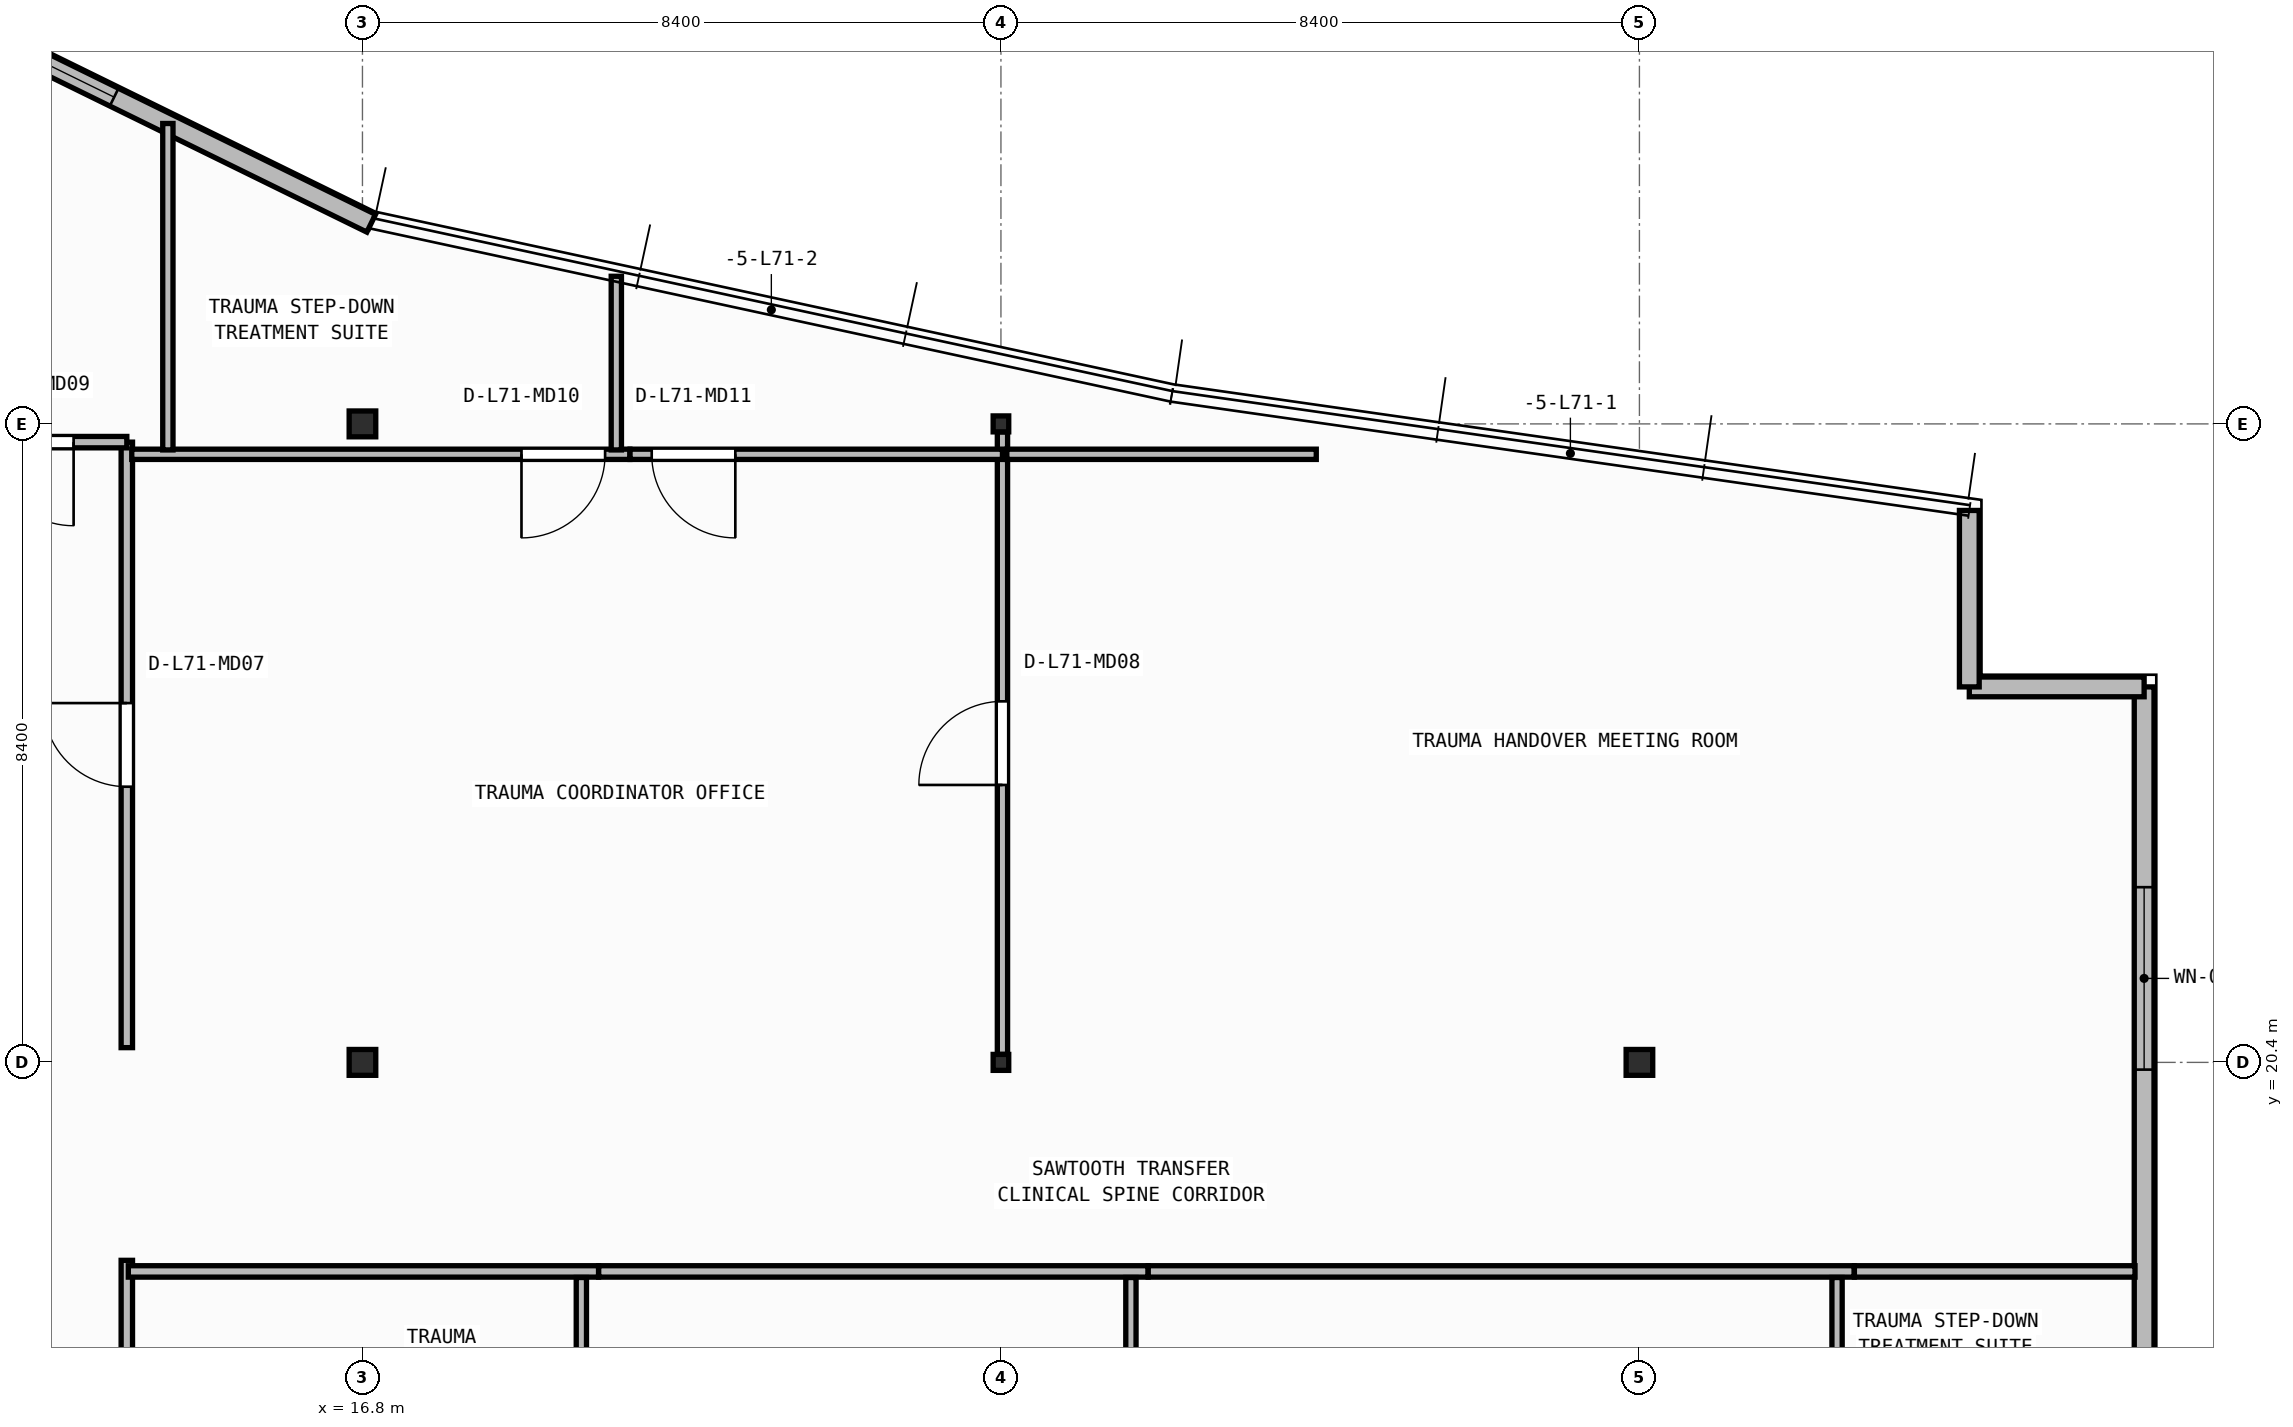
"""IFC4 building model, lengths in metres.
Left out: names, types, materials, properties, quantities, classifications, styles, units other than length and angle.
Written with IfcOpenShell. Run it as: python <this file> out.ifc"""

import sys

from ifc_helpers import new_model, si_unit, direction, frame, frame_2d, origin, origin_2d, place, context, subcontext, project, spatial, rectangle, i_section, extrude, element, fill, save


model = new_model("IFC4")
c1 = context("Model", 3, precision=1e-05, world=origin(), true_north=direction((0.0, 1.0)))
c2 = subcontext(c1, "Body", "Model", "MODEL_VIEW")
j1 = project(units=[si_unit("LENGTHUNIT", "METRE"), si_unit("PLANEANGLEUNIT", "RADIAN")], contexts=[c1])
p1 = place(None, origin())
s1 = spatial("IfcSite", under=j1, at=p1, CompositionType="ELEMENT")
p2 = place(p1, origin())
s2 = spatial("IfcBuilding", under=s1, at=p2, CompositionType="ELEMENT")
p3 = place(p2, frame((0.0, 0.0, 288.15)))
s3 = spatial("IfcBuildingStorey", under=s2, at=p3, CompositionType="ELEMENT", Elevation=288.15)
p4 = place(p3, frame((16.8, 20.4, 0.0), z_axis=(0.0, 0.0, 1.0), x_axis=(1.0, 0.0, 0.0)))
e1 = element("IfcColumn", 1, at=p4, inside=s3, PredefinedType="COLUMN", context=c2, shape_type="SweptSolid", body=[
    extrude(i_section(OverallWidth=0.35, OverallDepth=0.34, WebThickness=0.016, FlangeThickness=0.028, at=origin_2d()), origin(), (0.0, 0.0, 1.0), 3.95),
])
p5 = place(p3, frame((25.2, 20.4, 0.0), z_axis=(0.0, 0.0, 1.0), x_axis=(1.0, 0.0, 0.0)))
e2 = element("IfcColumn", 2, at=p5, inside=s3, PredefinedType="COLUMN", context=c2, shape_type="SweptSolid", body=[
    extrude(i_section(OverallWidth=0.205, OverallDepth=0.21, WebThickness=0.009, FlangeThickness=0.014, FilletRadius=0.011, at=origin_2d()), origin(), (0.0, 0.0, 1.0), 3.95),
])
for number, where, z_axis, x_axis in (
    (3, (33.6, 20.4, 0.0), (0.0, 0.0, 1.0), (1.0, 0.0, 0.0)),
    (4, (16.8, 28.8, 0.0), (0.0, 0.0, 1.0), (1.0, 0.0, 0.0)),
):
    element("IfcColumn", number, at=place(p3, frame(where, z_axis=z_axis, x_axis=x_axis)), inside=s3, PredefinedType="COLUMN", context=c2, shape_type="SweptSolid", body=[
        extrude(i_section(OverallWidth=0.35, OverallDepth=0.34, WebThickness=0.016, FlangeThickness=0.028, at=origin_2d()), origin(), (0.0, 0.0, 1.0), 3.95),
    ])
p6 = place(p3, frame((25.2, 28.8, 0.0), z_axis=(0.0, 0.0, 1.0), x_axis=(1.0, 0.0, 0.0)))
e5 = element("IfcColumn", 5, at=p6, inside=s3, PredefinedType="COLUMN", context=c2, shape_type="SweptSolid", body=[
    extrude(i_section(OverallWidth=0.205, OverallDepth=0.21, WebThickness=0.009, FlangeThickness=0.014, FilletRadius=0.011, at=origin_2d()), origin(), (0.0, 0.0, 1.0), 3.95),
])
p7 = place(p3, frame((40.24, 4.86, 0.0), z_axis=(0.0, 0.0, 1.0), x_axis=(0.0, 1.0, 0.0)))
e6 = element("IfcWall", 6, at=p7, inside=s3, PredefinedType="STANDARD", context=c2, shape_type="SweptSolid", body=[
    extrude(rectangle(XDim=20.48, YDim=0.26, at=frame_2d((10.24, 0.0))), origin(), (0.0, 0.0, 1.0), 3.71),
])
p8 = place(p7, frame((15.445, 0.0, 0.9)))
e7 = element("IfcOpeningElement", 7, at=p8, cuts=e6, PredefinedType="OPENING", context=c2, shape_type="SweptSolid", body=[
    extrude(rectangle(XDim=2.4, YDim=1.65, at=frame_2d((1.2, 0.825))), frame((0.0, 0.14, 0.0), z_axis=(0.0, -1.0, 0.0), x_axis=(1.0, 0.0, 0.0)), (0.0, 0.0, 1.0), 0.28),
])
p9 = place(p3, frame((40.24, 25.34, 0.0), z_axis=(0.0, 0.0, 1.0), x_axis=(-1.0, 0.0, 0.0)))
e8 = element("IfcWall", 8, at=p9, inside=s3, PredefinedType="STANDARD", context=c2, shape_type="SweptSolid", body=[
    extrude(rectangle(XDim=2.3, YDim=0.26, at=frame_2d((1.15, 0.0))), origin(), (0.0, 0.0, 1.0), 3.71),
])
p10 = place(p3, frame((37.94, 25.34, 0.0), z_axis=(0.0, 0.0, 1.0), x_axis=(0.0, 1.0, 0.0)))
e9 = element("IfcWall", 9, at=p10, inside=s3, PredefinedType="STANDARD", context=c2, shape_type="SweptSolid", body=[
    extrude(rectangle(XDim=2.321, YDim=0.26, at=frame_2d((1.161, 0.0))), origin(), (0.0, 0.0, 1.0), 3.71),
])
p11 = place(p3, frame((16.915, 31.44, 0.0), z_axis=(0.0, 0.0, 1.0), x_axis=(-0.897793077248, 0.440417518322, 0.0)))
e10 = element("IfcWall", 10, at=p11, inside=s3, PredefinedType="STANDARD", context=c2, shape_type="SweptSolid", body=[
    extrude(rectangle(XDim=9.934, YDim=0.26, at=frame_2d((4.967, 0.0))), origin(), (0.0, 0.0, 1.0), 3.71),
])
p12 = place(p11, frame((3.767, 0.0, 0.9)))
e11 = element("IfcOpeningElement", 11, at=p12, cuts=e10, PredefinedType="OPENING", context=c2, shape_type="SweptSolid", body=[
    extrude(rectangle(XDim=2.4, YDim=1.65, at=frame_2d((1.2, 0.825))), frame((0.0, 0.14, 0.0), z_axis=(0.0, -1.0, 0.0), x_axis=(1.0, 0.0, 0.0)), (0.0, 0.0, 1.0), 0.28),
])
p13 = place(p3, frame((13.7, 14.7, 0.0), z_axis=(0.0, 0.0, 1.0), x_axis=(0.0, 1.0, 0.0)))
e12 = element("IfcWall", 12, at=p13, inside=s3, PredefinedType="PARTITIONING", context=c2, shape_type="SweptSolid", body=[
    extrude(rectangle(XDim=3.096, YDim=0.15, at=frame_2d((1.548, 0.0))), origin(), (0.0, 0.0, 1.0), 3.71),
])
p14 = place(p3, frame((13.7, 20.594, 0.0), z_axis=(0.0, 0.0, 1.0), x_axis=(0.0, 1.0, 0.0)))
e13 = element("IfcWall", 13, at=p14, inside=s3, PredefinedType="PARTITIONING", context=c2, shape_type="SweptSolid", body=[
    extrude(rectangle(XDim=7.966, YDim=0.15, at=frame_2d((3.983, 0.0))), origin(), (0.0, 0.0, 1.0), 3.71),
])
p15 = place(p14, frame((3.433, 0.0, 0.0)))
e14 = element("IfcOpeningElement", 14, at=p15, cuts=e13, PredefinedType="OPENING", context=c2, shape_type="SweptSolid", body=[
    extrude(rectangle(XDim=1.1, YDim=2.1, at=frame_2d((0.55, 1.05))), frame((0.0, 0.085, 0.0), z_axis=(0.0, -1.0, 0.0), x_axis=(1.0, 0.0, 0.0)), (0.0, 0.0, 1.0), 0.17),
])
p16 = place(p3, frame((13.7, 28.56, 0.0), z_axis=(0.0, 0.0, 1.0), x_axis=(-1.0, 0.0, 0.0)))
e15 = element("IfcWall", 15, at=p16, inside=s3, PredefinedType="PARTITIONING", context=c2, shape_type="SweptSolid", body=[
    extrude(rectangle(XDim=2.5, YDim=0.15, at=frame_2d((1.25, 0.0))), origin(), (0.0, 0.0, 1.0), 3.157),
])
p17 = place(p16, frame((0.7, 0.0, 0.0)))
e16 = element("IfcOpeningElement", 16, at=p17, cuts=e15, PredefinedType="OPENING", context=c2, shape_type="SweptSolid", body=[
    extrude(rectangle(XDim=1.1, YDim=2.1, at=frame_2d((0.55, 1.05))), frame((0.0, 0.085, 0.0), z_axis=(0.0, -1.0, 0.0), x_axis=(1.0, 0.0, 0.0)), (0.0, 0.0, 1.0), 0.17),
])
p18 = place(p3, frame((13.72, 17.65, 0.0), z_axis=(0.0, 0.0, 1.0), x_axis=(1.0, 0.0, 0.0)))
e17 = element("IfcWall", 17, at=p18, inside=s3, PredefinedType="PARTITIONING", context=c2, shape_type="SweptSolid", body=[
    extrude(rectangle(XDim=6.186, YDim=0.15, at=frame_2d((3.093, 0.0))), origin(), (0.0, 0.0, 1.0), 3.71),
])
p19 = place(p3, frame((19.908, 17.65, 0.0), z_axis=(0.0, 0.0, 1.0), x_axis=(1.0, 0.0, 0.0)))
e18 = element("IfcWall", 18, at=p19, inside=s3, PredefinedType="PARTITIONING", context=c2, shape_type="SweptSolid", body=[
    extrude(rectangle(XDim=7.228, YDim=0.15, at=frame_2d((3.614, 0.0))), origin(), (0.0, 0.0, 1.0), 3.71),
])
p20 = place(p3, frame((27.138, 17.65, 0.0), z_axis=(0.0, 0.0, 1.0), x_axis=(1.0, 0.0, 0.0)))
e19 = element("IfcWall", 19, at=p20, inside=s3, PredefinedType="PARTITIONING", context=c2, shape_type="SweptSolid", body=[
    extrude(rectangle(XDim=9.288, YDim=0.15, at=frame_2d((4.644, 0.0))), origin(), (0.0, 0.0, 1.0), 3.71),
])
p21 = place(p3, frame((36.428, 17.65, 0.0), z_axis=(0.0, 0.0, 1.0), x_axis=(1.0, 0.0, 0.0)))
e20 = element("IfcWall", 20, at=p21, inside=s3, PredefinedType="PARTITIONING", context=c2, shape_type="SweptSolid", body=[
    extrude(rectangle(XDim=3.692, YDim=0.15, at=frame_2d((1.846, 0.0))), origin(), (0.0, 0.0, 1.0), 3.71),
])
for number, where, z_axis, x_axis in (
    (21, (19.68, 14.76, 0.0), (0.0, 0.0, 1.0), (0.0, 1.0, 0.0)),
    (22, (26.91, 14.76, 0.0), (0.0, 0.0, 1.0), (0.0, 1.0, 0.0)),
    (23, (36.2, 14.76, 0.0), (0.0, 0.0, 1.0), (0.0, 1.0, 0.0)),
):
    element("IfcWall", number, at=place(p3, frame(where, z_axis=z_axis, x_axis=x_axis)), inside=s3, PredefinedType="PARTITIONING", context=c2, shape_type="SweptSolid", body=[
        extrude(rectangle(XDim=2.81, YDim=0.135, at=frame_2d((1.405, 0.0))), origin(), (0.0, 0.0, 1.0), 3.71),
    ])
p22 = place(p3, frame((25.22, 20.505, 0.0), z_axis=(0.0, 0.0, 1.0), x_axis=(0.0, 1.0, 0.0)))
e24 = element("IfcWall", 24, at=p22, inside=s3, PredefinedType="PARTITIONING", context=c2, shape_type="SweptSolid", body=[
    extrude(rectangle(XDim=8.19, YDim=0.135, at=frame_2d((4.095, 0.0))), origin(), (0.0, 0.0, 1.0), 3.157),
])
p23 = place(p22, frame((3.545, 0.0, 0.0)))
e25 = element("IfcOpeningElement", 25, at=p23, cuts=e24, PredefinedType="OPENING", context=c2, shape_type="SweptSolid", body=[
    extrude(rectangle(XDim=1.1, YDim=2.1, at=frame_2d((0.55, 1.05))), frame((0.0, 0.077, 0.0), z_axis=(0.0, -1.0, 0.0), x_axis=(1.0, 0.0, 0.0)), (0.0, 0.0, 1.0), 0.155),
])
p24 = place(p3, frame((20.319, 28.4, 0.0), z_axis=(0.0, 0.0, 1.0), x_axis=(-1.0, 0.0, 0.0)))
e26 = element("IfcWall", 26, at=p24, inside=s3, PredefinedType="PARTITIONING", context=c2, shape_type="SweptSolid", body=[
    extrude(rectangle(XDim=6.554, YDim=0.135, at=frame_2d((3.277, 0.0))), origin(), (0.0, 0.0, 1.0), 3.157),
])
p25 = place(p24, frame((0.326, 0.0, 0.0)))
e27 = element("IfcOpeningElement", 27, at=p25, cuts=e26, PredefinedType="OPENING", context=c2, shape_type="SweptSolid", body=[
    extrude(rectangle(XDim=1.1, YDim=2.1, at=frame_2d((0.55, 1.05))), frame((0.0, 0.077, 0.0), z_axis=(0.0, -1.0, 0.0), x_axis=(1.0, 0.0, 0.0)), (0.0, 0.0, 1.0), 0.155),
])
p26 = place(p3, frame((25.22, 28.4, 0.0), z_axis=(0.0, 0.0, 1.0), x_axis=(-1.0, 0.0, 0.0)))
e28 = element("IfcWall", 28, at=p26, inside=s3, PredefinedType="PARTITIONING", context=c2, shape_type="SweptSolid", body=[
    extrude(rectangle(XDim=4.899, YDim=0.135, at=frame_2d((2.45, 0.0))), origin(), (0.0, 0.0, 1.0), 3.326),
])
p27 = place(p26, frame((3.514, 0.0, 0.0)))
e29 = element("IfcOpeningElement", 29, at=p27, cuts=e28, PredefinedType="OPENING", context=c2, shape_type="SweptSolid", body=[
    extrude(rectangle(XDim=1.1, YDim=2.1, at=frame_2d((0.55, 1.05))), frame((0.0, 0.077, 0.0), z_axis=(0.0, -1.0, 0.0), x_axis=(1.0, 0.0, 0.0)), (0.0, 0.0, 1.0), 0.155),
])
p28 = place(p3, frame((29.348, 28.4, 0.0), z_axis=(0.0, 0.0, 1.0), x_axis=(-1.0, 0.0, 0.0)))
e30 = element("IfcWall", 30, at=p28, inside=s3, PredefinedType="PARTITIONING", context=c2, shape_type="SweptSolid", body=[
    extrude(rectangle(XDim=4.071, YDim=0.135, at=frame_2d((2.035, 0.0))), origin(), (0.0, 0.0, 1.0), 3.71),
])
p29 = place(p3, frame((14.24, 28.458, 0.0), z_axis=(0.0, 0.0, 1.0), x_axis=(0.0, 1.0, 0.0)))
e31 = element("IfcWall", 31, at=p29, inside=s3, PredefinedType="PARTITIONING", context=c2, shape_type="SweptSolid", body=[
    extrude(rectangle(XDim=4.294, YDim=0.135, at=frame_2d((2.147, 0.0))), origin(), (0.0, 0.0, 1.0), 3.71),
])
p30 = place(p3, frame((20.14, 28.458, 0.0), z_axis=(0.0, 0.0, 1.0), x_axis=(0.0, 1.0, 0.0)))
e32 = element("IfcWall", 32, at=p30, inside=s3, PredefinedType="PARTITIONING", context=c2, shape_type="SweptSolid", body=[
    extrude(rectangle(XDim=2.285, YDim=0.135, at=frame_2d((1.142, 0.0))), origin(), (0.0, 0.0, 1.0), 3.71),
])
p31 = place(p8, origin())
e33 = element("IfcWindow", 33, at=p31, inside=s3, PartitioningType="SINGLE_PANEL", PredefinedType="WINDOW", context=c2, shape_type="SweptSolid", body=[
    extrude(rectangle(XDim=2.4, YDim=1.65, at=frame_2d((1.2, 0.825))), frame((0.0, 0.03, 0.0), z_axis=(0.0, -1.0, 0.0), x_axis=(1.0, 0.0, 0.0)), (0.0, 0.0, 1.0), 0.06),
])
fill(e7, e33)
p32 = place(p12, origin())
e34 = element("IfcWindow", 34, at=p32, inside=s3, PartitioningType="SINGLE_PANEL", PredefinedType="WINDOW", context=c2, shape_type="SweptSolid", body=[
    extrude(rectangle(XDim=2.4, YDim=1.65, at=frame_2d((1.2, 0.825))), frame((0.0, 0.03, 0.0), z_axis=(0.0, -1.0, 0.0), x_axis=(1.0, 0.0, 0.0)), (0.0, 0.0, 1.0), 0.06),
])
fill(e11, e34)
p33 = place(p15, origin())
e35 = element("IfcDoor", 35, at=p33, inside=s3, OperationType="SINGLE_SWING_RIGHT", PredefinedType="DOOR", context=c2, shape_type="SweptSolid", body=[
    extrude(rectangle(XDim=1.1, YDim=2.1, at=frame_2d((0.55, 1.05))), frame((0.0, 0.025, 0.0), z_axis=(0.0, -1.0, 0.0), x_axis=(1.0, 0.0, 0.0)), (0.0, 0.0, 1.0), 0.05),
])
fill(e14, e35)
p34 = place(p17, origin())
e36 = element("IfcDoor", 36, at=p34, inside=s3, OperationType="SINGLE_SWING_LEFT", PredefinedType="DOOR", context=c2, shape_type="SweptSolid", body=[
    extrude(rectangle(XDim=1.1, YDim=2.1, at=frame_2d((0.55, 1.05))), frame((0.0, 0.025, 0.0), z_axis=(0.0, -1.0, 0.0), x_axis=(1.0, 0.0, 0.0)), (0.0, 0.0, 1.0), 0.05),
])
fill(e16, e36)
p35 = place(p23, origin())
e37 = element("IfcDoor", 37, at=p35, inside=s3, OperationType="SINGLE_SWING_LEFT", PredefinedType="DOOR", context=c2, shape_type="SweptSolid", body=[
    extrude(rectangle(XDim=1.1, YDim=2.1, at=frame_2d((0.55, 1.05))), frame((0.0, 0.025, 0.0), z_axis=(0.0, -1.0, 0.0), x_axis=(1.0, 0.0, 0.0)), (0.0, 0.0, 1.0), 0.05),
])
fill(e25, e37)
p36 = place(p25, origin())
e38 = element("IfcDoor", 38, at=p36, inside=s3, OperationType="SINGLE_SWING_RIGHT", PredefinedType="DOOR", context=c2, shape_type="SweptSolid", body=[
    extrude(rectangle(XDim=1.1, YDim=2.1, at=frame_2d((0.55, 1.05))), frame((0.0, 0.025, 0.0), z_axis=(0.0, -1.0, 0.0), x_axis=(1.0, 0.0, 0.0)), (0.0, 0.0, 1.0), 0.05),
])
fill(e27, e38)
p37 = place(p27, origin())
e39 = element("IfcDoor", 39, at=p37, inside=s3, OperationType="SINGLE_SWING_LEFT", PredefinedType="DOOR", context=c2, shape_type="SweptSolid", body=[
    extrude(rectangle(XDim=1.1, YDim=2.1, at=frame_2d((0.55, 1.05))), frame((0.0, 0.025, 0.0), z_axis=(0.0, -1.0, 0.0), x_axis=(1.0, 0.0, 0.0)), (0.0, 0.0, 1.0), 0.05),
])
fill(e29, e39)
save(model, sys.argv[1])
